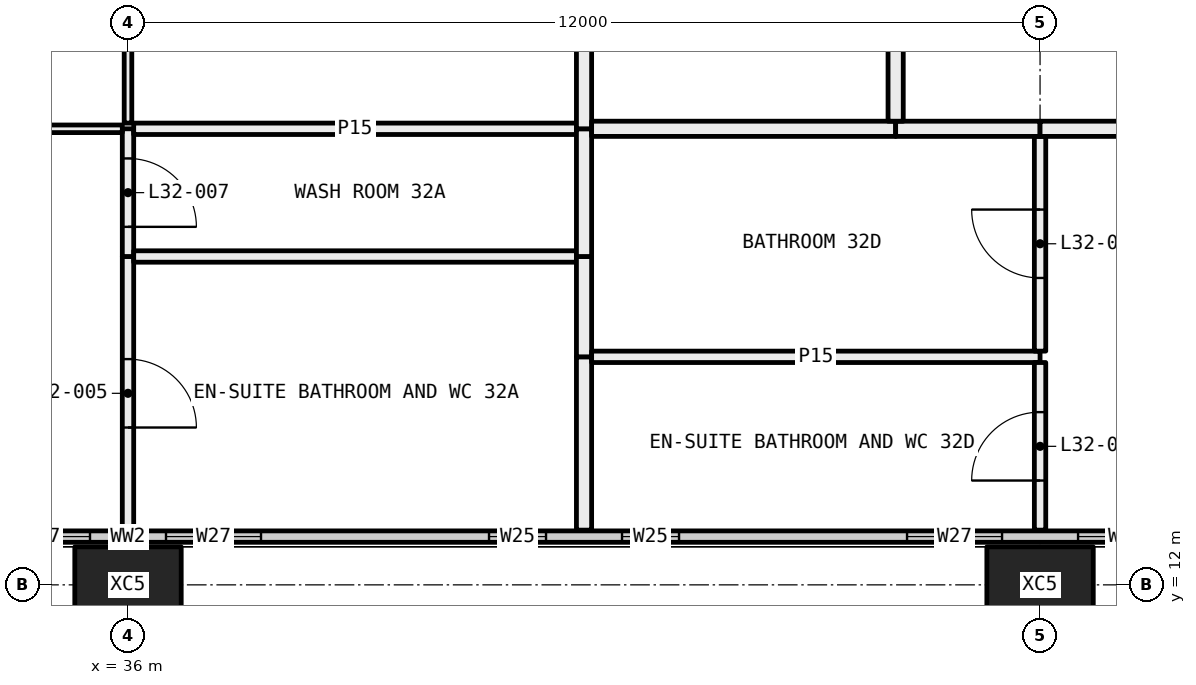
"""IFC4 building model, lengths in metres.
Left out: names, types, materials, properties, quantities, classifications, styles, units other than length and angle.
Written with IfcOpenShell. Run it as: python <this file> out.ifc"""

import sys

from ifc_helpers import new_model, si_unit, direction, frame, frame_2d, origin, origin_2d, place, context, subcontext, project, spatial, rectangle, hollow_rectangle, extrude, element, fill, save


model = new_model("IFC4")
c1 = context("Model", 3, precision=1e-05, world=origin(), true_north=direction((0.0, 1.0)))
c2 = subcontext(c1, "Body", "Model", "MODEL_VIEW")
j1 = project(units=[si_unit("LENGTHUNIT", "METRE"), si_unit("PLANEANGLEUNIT", "RADIAN")], contexts=[c1])
p1 = place(None, origin())
s1 = spatial("IfcSite", under=j1, at=p1, CompositionType="ELEMENT")
p2 = place(p1, origin())
s2 = spatial("IfcBuilding", under=s1, at=p2, CompositionType="ELEMENT")
p3 = place(p2, frame((0.0, 0.0, 124.2)))
s3 = spatial("IfcBuildingStorey", under=s2, at=p3, CompositionType="ELEMENT", Elevation=124.2)
for number, where, z_axis, x_axis in (
    (1, (36.0, 12.0, -0.4), (0.0, 0.0, 1.0), (1.0, 0.0, 0.0)),
    (2, (48.0, 12.0, -0.4), (0.0, 0.0, 1.0), (1.0, 0.0, 0.0)),
):
    element("IfcColumn", number, at=place(p3, frame(where, z_axis=z_axis, x_axis=x_axis)), inside=s3, PredefinedType="COLUMN", context=c2, shape_type="SweptSolid", body=[
        extrude(hollow_rectangle(XDim=1.4, YDim=1.0, WallThickness=0.055, at=origin_2d()), origin(), (0.0, 0.0, 1.0), 3.45),
    ])
p4 = place(p3, frame((6.56, 12.635, 0.0), z_axis=(0.0, 0.0, 1.0), x_axis=(1.0, 0.0, 0.0)))
e3 = element("IfcWall", 3, at=p4, inside=s3, PredefinedType="ELEMENTEDWALL", context=c2, shape_type="SweptSolid", body=[
    extrude(rectangle(XDim=58.88, YDim=0.15, at=frame_2d((29.44, 0.0))), origin(), (0.0, 0.0, 1.0), 3.05),
])
p5 = place(p4, frame((0.44, 0.0, 0.45)))
e4 = element("IfcOpeningElement", 4, at=p5, cuts=e3, PredefinedType="OPENING", context=c2, shape_type="SweptSolid", body=[
    extrude(rectangle(XDim=4.5, YDim=2.55, at=frame_2d((2.25, 1.275))), frame((0.0, 0.085, 0.0), z_axis=(0.0, -1.0, 0.0), x_axis=(1.0, 0.0, 0.0)), (0.0, 0.0, 1.0), 0.17),
])
p6 = place(p4, frame((5.94, 0.0, 0.45)))
e5 = element("IfcOpeningElement", 5, at=p6, cuts=e3, PredefinedType="OPENING", context=c2, shape_type="SweptSolid", body=[
    extrude(rectangle(XDim=1.25, YDim=2.55, at=frame_2d((0.625, 1.275))), frame((0.0, 0.085, 0.0), z_axis=(0.0, -1.0, 0.0), x_axis=(1.0, 0.0, 0.0)), (0.0, 0.0, 1.0), 0.17),
])
p7 = place(p4, frame((10.19, 0.0, 0.45)))
e6 = element("IfcOpeningElement", 6, at=p7, cuts=e3, PredefinedType="OPENING", context=c2, shape_type="SweptSolid", body=[
    extrude(rectangle(XDim=0.75, YDim=2.55, at=frame_2d((0.375, 1.275))), frame((0.0, 0.085, 0.0), z_axis=(0.0, -1.0, 0.0), x_axis=(1.0, 0.0, 0.0)), (0.0, 0.0, 1.0), 0.17),
])
p8 = place(p4, frame((11.94, 0.0, 0.45)))
e7 = element("IfcOpeningElement", 7, at=p8, cuts=e3, PredefinedType="OPENING", context=c2, shape_type="SweptSolid", body=[
    extrude(rectangle(XDim=0.75, YDim=2.55, at=frame_2d((0.375, 1.275))), frame((0.0, 0.085, 0.0), z_axis=(0.0, -1.0, 0.0), x_axis=(1.0, 0.0, 0.0)), (0.0, 0.0, 1.0), 0.17),
])
p9 = place(p4, frame((15.69, 0.0, 0.45)))
e8 = element("IfcOpeningElement", 8, at=p9, cuts=e3, PredefinedType="OPENING", context=c2, shape_type="SweptSolid", body=[
    extrude(rectangle(XDim=1.25, YDim=2.55, at=frame_2d((0.625, 1.275))), frame((0.0, 0.085, 0.0), z_axis=(0.0, -1.0, 0.0), x_axis=(1.0, 0.0, 0.0)), (0.0, 0.0, 1.0), 0.17),
])
p10 = place(p4, frame((17.94, 0.0, 0.45)))
e9 = element("IfcOpeningElement", 9, at=p10, cuts=e3, PredefinedType="OPENING", context=c2, shape_type="SweptSolid", body=[
    extrude(rectangle(XDim=1.25, YDim=2.55, at=frame_2d((0.625, 1.275))), frame((0.0, 0.085, 0.0), z_axis=(0.0, -1.0, 0.0), x_axis=(1.0, 0.0, 0.0)), (0.0, 0.0, 1.0), 0.17),
])
p11 = place(p4, frame((22.19, 0.0, 0.45)))
e10 = element("IfcOpeningElement", 10, at=p11, cuts=e3, PredefinedType="OPENING", context=c2, shape_type="SweptSolid", body=[
    extrude(rectangle(XDim=0.75, YDim=2.55, at=frame_2d((0.375, 1.275))), frame((0.0, 0.085, 0.0), z_axis=(0.0, -1.0, 0.0), x_axis=(1.0, 0.0, 0.0)), (0.0, 0.0, 1.0), 0.17),
])
p12 = place(p4, frame((23.94, 0.0, 0.45)))
e11 = element("IfcOpeningElement", 11, at=p12, cuts=e3, PredefinedType="OPENING", context=c2, shape_type="SweptSolid", body=[
    extrude(rectangle(XDim=0.75, YDim=2.55, at=frame_2d((0.375, 1.275))), frame((0.0, 0.085, 0.0), z_axis=(0.0, -1.0, 0.0), x_axis=(1.0, 0.0, 0.0)), (0.0, 0.0, 1.0), 0.17),
])
p13 = place(p4, frame((27.69, 0.0, 0.45)))
e12 = element("IfcOpeningElement", 12, at=p13, cuts=e3, PredefinedType="OPENING", context=c2, shape_type="SweptSolid", body=[
    extrude(rectangle(XDim=1.25, YDim=2.55, at=frame_2d((0.625, 1.275))), frame((0.0, 0.085, 0.0), z_axis=(0.0, -1.0, 0.0), x_axis=(1.0, 0.0, 0.0)), (0.0, 0.0, 1.0), 0.17),
])
p14 = place(p4, frame((29.94, 0.0, 0.45)))
e13 = element("IfcOpeningElement", 13, at=p14, cuts=e3, PredefinedType="OPENING", context=c2, shape_type="SweptSolid", body=[
    extrude(rectangle(XDim=1.25, YDim=2.55, at=frame_2d((0.625, 1.275))), frame((0.0, 0.085, 0.0), z_axis=(0.0, -1.0, 0.0), x_axis=(1.0, 0.0, 0.0)), (0.0, 0.0, 1.0), 0.17),
])
p15 = place(p4, frame((34.19, 0.0, 0.45)))
e14 = element("IfcOpeningElement", 14, at=p15, cuts=e3, PredefinedType="OPENING", context=c2, shape_type="SweptSolid", body=[
    extrude(rectangle(XDim=0.75, YDim=2.55, at=frame_2d((0.375, 1.275))), frame((0.0, 0.085, 0.0), z_axis=(0.0, -1.0, 0.0), x_axis=(1.0, 0.0, 0.0)), (0.0, 0.0, 1.0), 0.17),
])
p16 = place(p4, frame((35.94, 0.0, 0.45)))
e15 = element("IfcOpeningElement", 15, at=p16, cuts=e3, PredefinedType="OPENING", context=c2, shape_type="SweptSolid", body=[
    extrude(rectangle(XDim=0.75, YDim=2.55, at=frame_2d((0.375, 1.275))), frame((0.0, 0.085, 0.0), z_axis=(0.0, -1.0, 0.0), x_axis=(1.0, 0.0, 0.0)), (0.0, 0.0, 1.0), 0.17),
])
p17 = place(p4, frame((39.69, 0.0, 0.45)))
e16 = element("IfcOpeningElement", 16, at=p17, cuts=e3, PredefinedType="OPENING", context=c2, shape_type="SweptSolid", body=[
    extrude(rectangle(XDim=1.25, YDim=2.55, at=frame_2d((0.625, 1.275))), frame((0.0, 0.085, 0.0), z_axis=(0.0, -1.0, 0.0), x_axis=(1.0, 0.0, 0.0)), (0.0, 0.0, 1.0), 0.17),
])
p18 = place(p4, frame((41.94, 0.0, 0.45)))
e17 = element("IfcOpeningElement", 17, at=p18, cuts=e3, PredefinedType="OPENING", context=c2, shape_type="SweptSolid", body=[
    extrude(rectangle(XDim=1.25, YDim=2.55, at=frame_2d((0.625, 1.275))), frame((0.0, 0.085, 0.0), z_axis=(0.0, -1.0, 0.0), x_axis=(1.0, 0.0, 0.0)), (0.0, 0.0, 1.0), 0.17),
])
p19 = place(p4, frame((46.19, 0.0, 0.45)))
e18 = element("IfcOpeningElement", 18, at=p19, cuts=e3, PredefinedType="OPENING", context=c2, shape_type="SweptSolid", body=[
    extrude(rectangle(XDim=0.75, YDim=2.55, at=frame_2d((0.375, 1.275))), frame((0.0, 0.085, 0.0), z_axis=(0.0, -1.0, 0.0), x_axis=(1.0, 0.0, 0.0)), (0.0, 0.0, 1.0), 0.17),
])
p20 = place(p4, frame((47.94, 0.0, 0.45)))
e19 = element("IfcOpeningElement", 19, at=p20, cuts=e3, PredefinedType="OPENING", context=c2, shape_type="SweptSolid", body=[
    extrude(rectangle(XDim=0.75, YDim=2.55, at=frame_2d((0.375, 1.275))), frame((0.0, 0.085, 0.0), z_axis=(0.0, -1.0, 0.0), x_axis=(1.0, 0.0, 0.0)), (0.0, 0.0, 1.0), 0.17),
])
p21 = place(p4, frame((51.69, 0.0, 0.45)))
e20 = element("IfcOpeningElement", 20, at=p21, cuts=e3, PredefinedType="OPENING", context=c2, shape_type="SweptSolid", body=[
    extrude(rectangle(XDim=1.25, YDim=2.55, at=frame_2d((0.625, 1.275))), frame((0.0, 0.085, 0.0), z_axis=(0.0, -1.0, 0.0), x_axis=(1.0, 0.0, 0.0)), (0.0, 0.0, 1.0), 0.17),
])
p22 = place(p4, frame((53.94, 0.0, 0.45)))
e21 = element("IfcOpeningElement", 21, at=p22, cuts=e3, PredefinedType="OPENING", context=c2, shape_type="SweptSolid", body=[
    extrude(rectangle(XDim=4.5, YDim=2.55, at=frame_2d((2.25, 1.275))), frame((0.0, 0.085, 0.0), z_axis=(0.0, -1.0, 0.0), x_axis=(1.0, 0.0, 0.0)), (0.0, 0.0, 1.0), 0.17),
])
p23 = place(p3, frame((36.0, 12.72, 0.0), z_axis=(0.0, 0.0, 1.0), x_axis=(0.0, 1.0, 0.0)))
e22 = element("IfcWall", 22, at=p23, inside=s3, PredefinedType="PARTITIONING", context=c2, shape_type="SweptSolid", body=[
    extrude(rectangle(XDim=3.6, YDim=0.15, at=frame_2d((1.8, 0.0))), origin(), (0.0, 0.0, 1.0), 2.45),
])
p24 = place(p23, frame((1.35, 0.0, 0.0)))
e23 = element("IfcOpeningElement", 23, at=p24, cuts=e22, PredefinedType="OPENING", context=c2, shape_type="SweptSolid", body=[
    extrude(rectangle(XDim=0.9, YDim=2.1, at=frame_2d((0.45, 1.05))), frame((0.0, 0.085, 0.0), z_axis=(0.0, -1.0, 0.0), x_axis=(1.0, 0.0, 0.0)), (0.0, 0.0, 1.0), 0.17),
])
p25 = place(p3, frame((36.0, 16.32, 0.0), z_axis=(0.0, 0.0, 1.0), x_axis=(0.0, 1.0, 0.0)))
e24 = element("IfcWall", 24, at=p25, inside=s3, PredefinedType="PARTITIONING", context=c2, shape_type="SweptSolid", body=[
    extrude(rectangle(XDim=1.68, YDim=0.15, at=frame_2d((0.84, 0.0))), origin(), (0.0, 0.0, 1.0), 2.45),
])
p26 = place(p25, frame((0.39, 0.0, 0.0)))
e25 = element("IfcOpeningElement", 25, at=p26, cuts=e24, PredefinedType="OPENING", context=c2, shape_type="SweptSolid", body=[
    extrude(rectangle(XDim=0.9, YDim=2.1, at=frame_2d((0.45, 1.05))), frame((0.0, 0.085, 0.0), z_axis=(0.0, -1.0, 0.0), x_axis=(1.0, 0.0, 0.0)), (0.0, 0.0, 1.0), 0.17),
])
p27 = place(p3, frame((35.925, 18.0, 0.0), z_axis=(0.0, 0.0, 1.0), x_axis=(-1.0, 0.0, 0.0)))
e26 = element("IfcWall", 26, at=p27, inside=s3, PredefinedType="PARTITIONING", context=c2, shape_type="SweptSolid", body=[
    extrude(rectangle(XDim=4.425, YDim=0.1, at=frame_2d((2.212, 0.0))), origin(), (0.0, 0.0, 1.0), 2.45),
])
p28 = place(p27, frame((1.762, 0.0, 0.0)))
e27 = element("IfcOpeningElement", 27, at=p28, cuts=e26, PredefinedType="OPENING", context=c2, shape_type="SweptSolid", body=[
    extrude(rectangle(XDim=0.9, YDim=2.1, at=frame_2d((0.45, 1.05))), frame((0.0, 0.06, 0.0), z_axis=(0.0, -1.0, 0.0), x_axis=(1.0, 0.0, 0.0)), (0.0, 0.0, 1.0), 0.12),
])
p29 = place(p3, frame((41.9, 16.32, 0.0), z_axis=(0.0, 0.0, 1.0), x_axis=(-1.0, 0.0, 0.0)))
e28 = element("IfcWall", 28, at=p29, inside=s3, PredefinedType="PARTITIONING", context=c2, shape_type="SweptSolid", body=[
    extrude(rectangle(XDim=5.825, YDim=0.15, at=frame_2d((2.913, 0.0))), origin(), (0.0, 0.0, 1.0), 2.45),
])
p30 = place(p3, frame((42.0, 12.72, 0.0), z_axis=(0.0, 0.0, 1.0), x_axis=(0.0, 1.0, 0.0)))
e29 = element("IfcWall", 29, at=p30, inside=s3, PredefinedType="PARTITIONING", context=c2, shape_type="SweptSolid", body=[
    extrude(rectangle(XDim=2.28, YDim=0.2, at=frame_2d((1.14, 0.0))), origin(), (0.0, 0.0, 1.0), 3.05),
])
p31 = place(p3, frame((42.0, 15.0, 0.0), z_axis=(0.0, 0.0, 1.0), x_axis=(0.0, 1.0, 0.0)))
e30 = element("IfcWall", 30, at=p31, inside=s3, PredefinedType="PARTITIONING", context=c2, shape_type="SweptSolid", body=[
    extrude(rectangle(XDim=1.32, YDim=0.2, at=frame_2d((0.66, 0.0))), origin(), (0.0, 0.0, 1.0), 3.05),
])
p32 = place(p3, frame((41.9, 18.0, 0.0), z_axis=(0.0, 0.0, 1.0), x_axis=(-1.0, 0.0, 0.0)))
e31 = element("IfcWall", 31, at=p32, inside=s3, PredefinedType="PARTITIONING", context=c2, shape_type="SweptSolid", body=[
    extrude(rectangle(XDim=5.825, YDim=0.15, at=frame_2d((2.913, 0.0))), origin(), (0.0, 0.0, 1.0), 2.45),
])
p33 = place(p3, frame((42.0, 16.32, 0.0), z_axis=(0.0, 0.0, 1.0), x_axis=(0.0, 1.0, 0.0)))
e32 = element("IfcWall", 32, at=p33, inside=s3, PredefinedType="PARTITIONING", context=c2, shape_type="SweptSolid", body=[
    extrude(rectangle(XDim=1.68, YDim=0.2, at=frame_2d((0.84, 0.0))), origin(), (0.0, 0.0, 1.0), 3.05),
])
p34 = place(p3, frame((36.0, 18.075, 0.0), z_axis=(0.0, 0.0, 1.0), x_axis=(0.0, 1.0, 0.0)))
e33 = element("IfcWall", 33, at=p34, inside=s3, PredefinedType="PARTITIONING", context=c2, shape_type="SweptSolid", body=[
    extrude(rectangle(XDim=5.175, YDim=0.1, at=frame_2d((2.587, 0.0))), origin(), (0.0, 0.0, 1.0), 2.45),
])
p35 = place(p34, frame((2.137, 0.0, 0.0)))
e34 = element("IfcOpeningElement", 34, at=p35, cuts=e33, PredefinedType="OPENING", context=c2, shape_type="SweptSolid", body=[
    extrude(rectangle(XDim=0.9, YDim=2.1, at=frame_2d((0.45, 1.05))), frame((0.0, 0.06, 0.0), z_axis=(0.0, -1.0, 0.0), x_axis=(1.0, 0.0, 0.0)), (0.0, 0.0, 1.0), 0.12),
])
p36 = place(p3, frame((42.0, 18.0, 0.0), z_axis=(0.0, 0.0, 1.0), x_axis=(0.0, 1.0, 0.0)))
e35 = element("IfcWall", 35, at=p36, inside=s3, PredefinedType="PARTITIONING", context=c2, shape_type="SweptSolid", body=[
    extrude(rectangle(XDim=6.3, YDim=0.2, at=frame_2d((3.15, 0.0))), origin(), (0.0, 0.0, 1.0), 2.45),
])
p37 = place(p3, frame((48.0, 15.0, 0.0), z_axis=(0.0, 0.0, 1.0), x_axis=(-1.0, 0.0, 0.0)))
e36 = element("IfcWall", 36, at=p37, inside=s3, PredefinedType="PARTITIONING", context=c2, shape_type="SweptSolid", body=[
    extrude(rectangle(XDim=5.9, YDim=0.15, at=frame_2d((2.95, 0.0))), origin(), (0.0, 0.0, 1.0), 3.05),
])
p38 = place(p3, frame((48.0, 12.72, 0.0), z_axis=(0.0, 0.0, 1.0), x_axis=(0.0, 1.0, 0.0)))
e37 = element("IfcWall", 37, at=p38, inside=s3, PredefinedType="PARTITIONING", context=c2, shape_type="SweptSolid", body=[
    extrude(rectangle(XDim=2.205, YDim=0.15, at=frame_2d((1.103, 0.0))), origin(), (0.0, 0.0, 1.0), 3.05),
])
p39 = place(p38, frame((0.653, 0.0, 0.0)))
e38 = element("IfcOpeningElement", 38, at=p39, cuts=e37, PredefinedType="OPENING", context=c2, shape_type="SweptSolid", body=[
    extrude(rectangle(XDim=0.9, YDim=2.1, at=frame_2d((0.45, 1.05))), frame((0.0, 0.085, 0.0), z_axis=(0.0, -1.0, 0.0), x_axis=(1.0, 0.0, 0.0)), (0.0, 0.0, 1.0), 0.17),
])
p40 = place(p3, frame((48.0, 15.075, 0.0), z_axis=(0.0, 0.0, 1.0), x_axis=(0.0, 1.0, 0.0)))
e39 = element("IfcWall", 39, at=p40, inside=s3, PredefinedType="PARTITIONING", context=c2, shape_type="SweptSolid", body=[
    extrude(rectangle(XDim=2.825, YDim=0.15, at=frame_2d((1.413, 0.0))), origin(), (0.0, 0.0, 1.0), 3.05),
])
p41 = place(p40, frame((0.962, 0.0, 0.0)))
e40 = element("IfcOpeningElement", 40, at=p41, cuts=e39, PredefinedType="OPENING", context=c2, shape_type="SweptSolid", body=[
    extrude(rectangle(XDim=0.9, YDim=2.1, at=frame_2d((0.45, 1.05))), frame((0.0, 0.085, 0.0), z_axis=(0.0, -1.0, 0.0), x_axis=(1.0, 0.0, 0.0)), (0.0, 0.0, 1.0), 0.17),
])
p42 = place(p3, frame((46.1, 18.0, 0.0), z_axis=(0.0, 0.0, 1.0), x_axis=(-1.0, 0.0, 0.0)))
e41 = element("IfcWall", 41, at=p42, inside=s3, PredefinedType="PARTITIONING", context=c2, shape_type="SweptSolid", body=[
    extrude(rectangle(XDim=4.0, YDim=0.2, at=frame_2d((2.0, 0.0))), origin(), (0.0, 0.0, 1.0), 3.05),
])
p43 = place(p3, frame((48.0, 18.0, 0.0), z_axis=(0.0, 0.0, 1.0), x_axis=(-1.0, 0.0, 0.0)))
e42 = element("IfcWall", 42, at=p43, inside=s3, PredefinedType="PARTITIONING", context=c2, shape_type="SweptSolid", body=[
    extrude(rectangle(XDim=1.9, YDim=0.2, at=frame_2d((0.95, 0.0))), origin(), (0.0, 0.0, 1.0), 3.05),
])
p44 = place(p3, frame((54.0, 18.0, 0.0), z_axis=(0.0, 0.0, 1.0), x_axis=(-1.0, 0.0, 0.0)))
e43 = element("IfcWall", 43, at=p44, inside=s3, PredefinedType="PARTITIONING", context=c2, shape_type="SweptSolid", body=[
    extrude(rectangle(XDim=6.0, YDim=0.2, at=frame_2d((3.0, 0.0))), origin(), (0.0, 0.0, 1.0), 3.05),
])
p45 = place(p44, frame((2.5, 0.0, 0.0)))
e44 = element("IfcOpeningElement", 44, at=p45, cuts=e43, PredefinedType="OPENING", context=c2, shape_type="SweptSolid", body=[
    extrude(rectangle(XDim=1.0, YDim=2.1, at=frame_2d((0.5, 1.05))), frame((0.0, 0.11, 0.0), z_axis=(0.0, -1.0, 0.0), x_axis=(1.0, 0.0, 0.0)), (0.0, 0.0, 1.0), 0.22),
])
p46 = place(p3, frame((46.1, 18.1, 0.0), z_axis=(0.0, 0.0, 1.0), x_axis=(0.0, 1.0, 0.0)))
e45 = element("IfcWall", 45, at=p46, inside=s3, PredefinedType="PARTITIONING", context=c2, shape_type="SweptSolid", body=[
    extrude(rectangle(XDim=6.0, YDim=0.2, at=frame_2d((3.0, 0.0))), origin(), (0.0, 0.0, 1.0), 2.45),
])
p47 = place(p46, frame((2.55, 0.0, 0.0)))
e46 = element("IfcOpeningElement", 46, at=p47, cuts=e45, PredefinedType="OPENING", context=c2, shape_type="SweptSolid", body=[
    extrude(rectangle(XDim=0.9, YDim=2.1, at=frame_2d((0.45, 1.05))), frame((0.0, 0.11, 0.0), z_axis=(0.0, -1.0, 0.0), x_axis=(1.0, 0.0, 0.0)), (0.0, 0.0, 1.0), 0.22),
])
p48 = place(p13, origin())
e47 = element("IfcWindow", 47, at=p48, inside=s3, PartitioningType="SINGLE_PANEL", PredefinedType="WINDOW", context=c2, shape_type="SweptSolid", body=[
    extrude(rectangle(XDim=1.25, YDim=2.55, at=frame_2d((0.625, 1.275))), frame((0.0, 0.03, 0.0), z_axis=(0.0, -1.0, 0.0), x_axis=(1.0, 0.0, 0.0)), (0.0, 0.0, 1.0), 0.06),
])
fill(e12, e47)
p49 = place(p14, origin())
e48 = element("IfcWindow", 48, at=p49, inside=s3, PartitioningType="SINGLE_PANEL", PredefinedType="WINDOW", context=c2, shape_type="SweptSolid", body=[
    extrude(rectangle(XDim=1.25, YDim=2.55, at=frame_2d((0.625, 1.275))), frame((0.0, 0.03, 0.0), z_axis=(0.0, -1.0, 0.0), x_axis=(1.0, 0.0, 0.0)), (0.0, 0.0, 1.0), 0.06),
])
fill(e13, e48)
p50 = place(p15, origin())
e49 = element("IfcWindow", 49, at=p50, inside=s3, PartitioningType="SINGLE_PANEL", PredefinedType="WINDOW", context=c2, shape_type="SweptSolid", body=[
    extrude(rectangle(XDim=0.75, YDim=2.55, at=frame_2d((0.375, 1.275))), frame((0.0, 0.03, 0.0), z_axis=(0.0, -1.0, 0.0), x_axis=(1.0, 0.0, 0.0)), (0.0, 0.0, 1.0), 0.06),
])
fill(e14, e49)
p51 = place(p16, origin())
e50 = element("IfcWindow", 50, at=p51, inside=s3, PartitioningType="SINGLE_PANEL", PredefinedType="WINDOW", context=c2, shape_type="SweptSolid", body=[
    extrude(rectangle(XDim=0.75, YDim=2.55, at=frame_2d((0.375, 1.275))), frame((0.0, 0.03, 0.0), z_axis=(0.0, -1.0, 0.0), x_axis=(1.0, 0.0, 0.0)), (0.0, 0.0, 1.0), 0.06),
])
fill(e15, e50)
p52 = place(p17, origin())
e51 = element("IfcWindow", 51, at=p52, inside=s3, PartitioningType="SINGLE_PANEL", PredefinedType="WINDOW", context=c2, shape_type="SweptSolid", body=[
    extrude(rectangle(XDim=1.25, YDim=2.55, at=frame_2d((0.625, 1.275))), frame((0.0, 0.03, 0.0), z_axis=(0.0, -1.0, 0.0), x_axis=(1.0, 0.0, 0.0)), (0.0, 0.0, 1.0), 0.06),
])
fill(e16, e51)
p53 = place(p18, origin())
e52 = element("IfcWindow", 52, at=p53, inside=s3, PartitioningType="SINGLE_PANEL", PredefinedType="WINDOW", context=c2, shape_type="SweptSolid", body=[
    extrude(rectangle(XDim=1.25, YDim=2.55, at=frame_2d((0.625, 1.275))), frame((0.0, 0.03, 0.0), z_axis=(0.0, -1.0, 0.0), x_axis=(1.0, 0.0, 0.0)), (0.0, 0.0, 1.0), 0.06),
])
fill(e17, e52)
p54 = place(p24, frame((0.9, 0.0, 0.0), x_axis=(-1.0, 0.0, 0.0)))
e53 = element("IfcDoor", 53, at=p54, inside=s3, OperationType="SINGLE_SWING_LEFT", PredefinedType="DOOR", context=c2, shape_type="SweptSolid", body=[
    extrude(rectangle(XDim=0.9, YDim=2.1, at=frame_2d((0.45, 1.05))), frame((0.0, 0.025, 0.0), z_axis=(0.0, -1.0, 0.0), x_axis=(1.0, 0.0, 0.0)), (0.0, 0.0, 1.0), 0.05),
])
fill(e23, e53)
p55 = place(p26, frame((0.9, 0.0, 0.0), x_axis=(-1.0, 0.0, 0.0)))
e54 = element("IfcDoor", 54, at=p55, inside=s3, OperationType="SINGLE_SWING_LEFT", PredefinedType="DOOR", context=c2, shape_type="SweptSolid", body=[
    extrude(rectangle(XDim=0.9, YDim=2.1, at=frame_2d((0.45, 1.05))), frame((0.0, 0.025, 0.0), z_axis=(0.0, -1.0, 0.0), x_axis=(1.0, 0.0, 0.0)), (0.0, 0.0, 1.0), 0.05),
])
fill(e25, e54)
p56 = place(p39, origin())
e55 = element("IfcDoor", 55, at=p56, inside=s3, OperationType="SINGLE_SWING_RIGHT", PredefinedType="DOOR", context=c2, shape_type="SweptSolid", body=[
    extrude(rectangle(XDim=0.9, YDim=2.1, at=frame_2d((0.45, 1.05))), frame((0.0, 0.025, 0.0), z_axis=(0.0, -1.0, 0.0), x_axis=(1.0, 0.0, 0.0)), (0.0, 0.0, 1.0), 0.05),
])
fill(e38, e55)
p57 = place(p41, origin())
e56 = element("IfcDoor", 56, at=p57, inside=s3, OperationType="SINGLE_SWING_LEFT", PredefinedType="DOOR", context=c2, shape_type="SweptSolid", body=[
    extrude(rectangle(XDim=0.9, YDim=2.1, at=frame_2d((0.45, 1.05))), frame((0.0, 0.025, 0.0), z_axis=(0.0, -1.0, 0.0), x_axis=(1.0, 0.0, 0.0)), (0.0, 0.0, 1.0), 0.05),
])
fill(e40, e56)
save(model, sys.argv[1])
